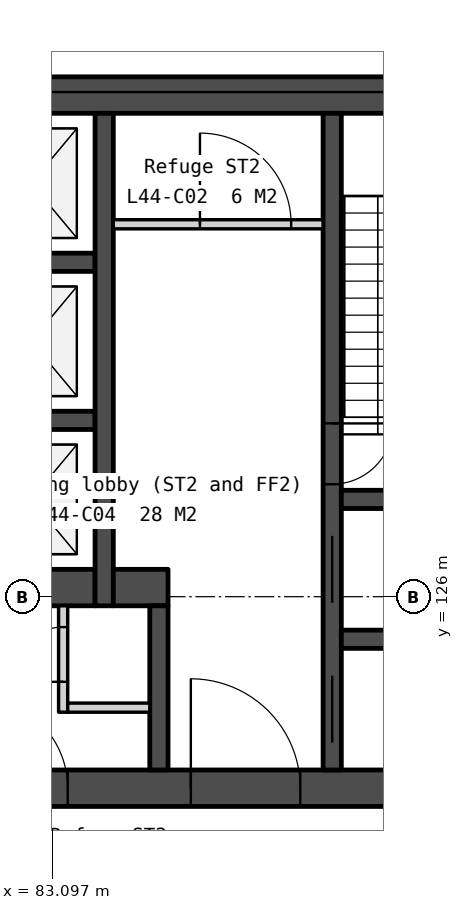
"""IFC4 building model, lengths in metres.
Left out: names, types, materials, properties, quantities, classifications, styles, units other than length and angle.
Written with IfcOpenShell. Run it as: python <this file> out.ifc"""

import sys

from ifc_helpers import new_model, si_unit, direction, frame, frame_2d, origin, place, context, subcontext, project, spatial, rectangle, extrude, element, fill, save


model = new_model("IFC4")
c1 = context("Model", 3, precision=1e-05, world=origin(), true_north=direction((0.0, 1.0)))
c2 = subcontext(c1, "Body", "Model", "MODEL_VIEW")
j1 = project(units=[si_unit("LENGTHUNIT", "METRE"), si_unit("PLANEANGLEUNIT", "RADIAN")], contexts=[c1])
p1 = place(None, origin())
s1 = spatial("IfcSite", under=j1, at=p1, CompositionType="ELEMENT")
p2 = place(p1, origin())
s2 = spatial("IfcBuilding", under=s1, at=p2, CompositionType="ELEMENT")
p3 = place(p2, frame((0.0, 0.0, 175.4)))
s3 = spatial("IfcBuildingStorey", under=s2, at=p3, CompositionType="ELEMENT", Elevation=175.4)
p4 = place(p3, frame((69.0, 134.25, 0.0), z_axis=(0.0, 0.0, 1.0), x_axis=(1.0, 0.0, 0.0)))
e1 = element("IfcWall", 1, at=p4, inside=s3, PredefinedType="SOLIDWALL", context=c2, shape_type="SweptSolid", body=[
    extrude(rectangle(XDim=22.0, YDim=0.6, at=frame_2d((11.0, 0.0))), origin(), (0.0, 0.0, 1.0), 4.35),
])
p5 = place(p3, frame((69.0, 122.85, 0.0), z_axis=(0.0, 0.0, 1.0), x_axis=(1.0, 0.0, 0.0)))
e2 = element("IfcWall", 2, at=p5, inside=s3, PredefinedType="SOLIDWALL", context=c2, shape_type="SweptSolid", body=[
    extrude(rectangle(XDim=22.0, YDim=0.6, at=frame_2d((11.0, 0.0))), origin(), (0.0, 0.0, 1.0), 4.35),
])
p6 = place(p5, frame((16.375, 0.0, 0.0)))
e3 = element("IfcOpeningElement", 3, at=p6, cuts=e2, PredefinedType="OPENING", context=c2, shape_type="SweptSolid", body=[
    extrude(rectangle(XDim=1.8, YDim=2.1, at=frame_2d((0.9, 1.05))), frame((0.0, 0.31, 0.0), z_axis=(0.0, -1.0, 0.0), x_axis=(1.0, 0.0, 0.0)), (0.0, 0.0, 1.0), 0.62),
])
p7 = place(p5, frame((3.825, 0.0, 0.0)))
e4 = element("IfcOpeningElement", 4, at=p7, cuts=e2, PredefinedType="OPENING", context=c2, shape_type="SweptSolid", body=[
    extrude(rectangle(XDim=1.8, YDim=2.1, at=frame_2d((0.9, 1.05))), frame((0.0, 0.31, 0.0), z_axis=(0.0, -1.0, 0.0), x_axis=(1.0, 0.0, 0.0)), (0.0, 0.0, 1.0), 0.62),
])
p8 = place(p5, frame((12.85, 0.0, 0.0)))
e5 = element("IfcOpeningElement", 5, at=p8, cuts=e2, PredefinedType="OPENING", context=c2, shape_type="SweptSolid", body=[
    extrude(rectangle(XDim=1.5, YDim=2.1, at=frame_2d((0.75, 1.05))), frame((0.0, 0.31, 0.0), z_axis=(0.0, -1.0, 0.0), x_axis=(1.0, 0.0, 0.0)), (0.0, 0.0, 1.0), 0.62),
])
for number, where, z_axis, x_axis in (
    (6, (81.7, 131.5, 0.0), (0.0, 0.0, 1.0), (1.0, 0.0, 0.0)),
    (7, (81.7, 128.9, 0.0), (0.0, 0.0, 1.0), (1.0, 0.0, 0.0)),
):
    element("IfcWall", number, at=place(p3, frame(where, z_axis=z_axis, x_axis=x_axis)), inside=s3, PredefinedType="SOLIDWALL", context=c2, shape_type="SweptSolid", body=[
        extrude(rectangle(XDim=2.1, YDim=0.3, at=frame_2d((1.05, 0.0))), origin(), (0.0, 0.0, 1.0), 4.35),
    ])
p9 = place(p3, frame((82.9, 126.15, 0.0), z_axis=(0.0, 0.0, 1.0), x_axis=(1.0, 0.0, 0.0)))
e8 = element("IfcWall", 8, at=p9, inside=s3, PredefinedType="SOLIDWALL", context=c2, shape_type="SweptSolid", body=[
    extrude(rectangle(XDim=0.9, YDim=0.6, at=frame_2d((0.45, 0.0))), origin(), (0.0, 0.0, 1.0), 4.35),
])
p10 = place(p3, frame((83.275, 125.85, 0.0), z_axis=(0.0, 0.0, 1.0), x_axis=(0.0, -1.0, 0.0)))
e9 = element("IfcWall", 9, at=p10, inside=s3, PredefinedType="PARTITIONING", context=c2, shape_type="SweptSolid", body=[
    extrude(rectangle(XDim=1.75, YDim=0.15, at=frame_2d((0.875, 0.0))), origin(), (0.0, 0.0, 1.0), 4.35),
])
p11 = place(p10, frame((0.35, 0.0, 0.0)))
e10 = element("IfcOpeningElement", 10, at=p11, cuts=e9, PredefinedType="OPENING", context=c2, shape_type="SweptSolid", body=[
    extrude(rectangle(XDim=0.9, YDim=2.1, at=frame_2d((0.45, 1.05))), frame((0.0, 0.085, 0.0), z_axis=(0.0, -1.0, 0.0), x_axis=(1.0, 0.0, 0.0)), (0.0, 0.0, 1.0), 0.17),
])
p12 = place(p3, frame((83.35, 124.175, 0.0), z_axis=(0.0, 0.0, 1.0), x_axis=(1.0, 0.0, 0.0)))
e11 = element("IfcWall", 11, at=p12, inside=s3, PredefinedType="PARTITIONING", context=c2, shape_type="SweptSolid", body=[
    extrude(rectangle(XDim=1.35, YDim=0.15, at=frame_2d((0.675, 0.0))), origin(), (0.0, 0.0, 1.0), 4.35),
])
p13 = place(p3, frame((83.95, 133.95, 0.0), z_axis=(0.0, 0.0, 1.0), x_axis=(0.0, -1.0, 0.0)))
e12 = element("IfcWall", 12, at=p13, inside=s3, PredefinedType="SOLIDWALL", context=c2, shape_type="SweptSolid", body=[
    extrude(rectangle(XDim=8.1, YDim=0.3, at=frame_2d((4.05, 0.0))), origin(), (0.0, 0.0, 1.0), 4.35),
])
p14 = place(p3, frame((84.1, 132.125, 0.0), z_axis=(0.0, 0.0, 1.0), x_axis=(1.0, 0.0, 0.0)))
e13 = element("IfcWall", 13, at=p14, inside=s3, PredefinedType="PARTITIONING", context=c2, shape_type="SweptSolid", body=[
    extrude(rectangle(XDim=3.45, YDim=0.15, at=frame_2d((1.725, 0.0))), origin(), (0.0, 0.0, 1.0), 4.35),
])
p15 = place(p14, frame((1.425, 0.0, 0.0)))
e14 = element("IfcOpeningElement", 14, at=p15, cuts=e13, PredefinedType="OPENING", context=c2, shape_type="SweptSolid", body=[
    extrude(rectangle(XDim=1.5, YDim=2.1, at=frame_2d((0.75, 1.05))), frame((0.0, 0.085, 0.0), z_axis=(0.0, -1.0, 0.0), x_axis=(1.0, 0.0, 0.0)), (0.0, 0.0, 1.0), 0.17),
])
p16 = place(p3, frame((84.1, 126.15, 0.0), z_axis=(0.0, 0.0, 1.0), x_axis=(1.0, 0.0, 0.0)))
e15 = element("IfcWall", 15, at=p16, inside=s3, PredefinedType="SOLIDWALL", context=c2, shape_type="SweptSolid", body=[
    extrude(rectangle(XDim=0.9, YDim=0.6, at=frame_2d((0.45, 0.0))), origin(), (0.0, 0.0, 1.0), 4.35),
])
p17 = place(p3, frame((84.85, 125.85, 0.0), z_axis=(0.0, 0.0, 1.0), x_axis=(0.0, -1.0, 0.0)))
e16 = element("IfcWall", 16, at=p17, inside=s3, PredefinedType="SOLIDWALL", context=c2, shape_type="SweptSolid", body=[
    extrude(rectangle(XDim=2.7, YDim=0.3, at=frame_2d((1.35, 0.0))), origin(), (0.0, 0.0, 1.0), 4.35),
])
p18 = place(p3, frame((87.7, 133.95, 0.0), z_axis=(0.0, 0.0, 1.0), x_axis=(0.0, -1.0, 0.0)))
e17 = element("IfcWall", 17, at=p18, inside=s3, PredefinedType="SOLIDWALL", context=c2, shape_type="SweptSolid", body=[
    extrude(rectangle(XDim=10.8, YDim=0.3, at=frame_2d((5.4, 0.0))), origin(), (0.0, 0.0, 1.0), 4.35),
])
p19 = place(p18, frame((6.95, 0.0, 0.0)))
e18 = element("IfcOpeningElement", 18, at=p19, cuts=e17, PredefinedType="OPENING", context=c2, shape_type="SweptSolid", body=[
    extrude(rectangle(XDim=1.1, YDim=2.1, at=frame_2d((0.55, 1.05))), frame((0.0, 0.16, 0.0), z_axis=(0.0, -1.0, 0.0), x_axis=(1.0, 0.0, 0.0)), (0.0, 0.0, 1.0), 0.32),
])
p20 = place(p18, frame((5.1, 0.0, 0.0)))
e19 = element("IfcOpeningElement", 19, at=p20, cuts=e17, PredefinedType="OPENING", context=c2, shape_type="SweptSolid", body=[
    extrude(rectangle(XDim=1.0, YDim=2.1, at=frame_2d((0.5, 1.05))), frame((0.0, 0.16, 0.0), z_axis=(0.0, -1.0, 0.0), x_axis=(1.0, 0.0, 0.0)), (0.0, 0.0, 1.0), 0.32),
])
p21 = place(p18, frame((9.25, 0.0, 0.0)))
e20 = element("IfcOpeningElement", 20, at=p21, cuts=e17, PredefinedType="OPENING", context=c2, shape_type="SweptSolid", body=[
    extrude(rectangle(XDim=1.1, YDim=2.1, at=frame_2d((0.55, 1.05))), frame((0.0, 0.16, 0.0), z_axis=(0.0, -1.0, 0.0), x_axis=(1.0, 0.0, 0.0)), (0.0, 0.0, 1.0), 0.32),
])
for number, where, z_axis, x_axis in (
    (21, (87.85, 127.6, 0.0), (0.0, 0.0, 1.0), (1.0, 0.0, 0.0)),
    (22, (87.85, 125.3, 0.0), (0.0, 0.0, 1.0), (1.0, 0.0, 0.0)),
):
    element("IfcWall", number, at=place(p3, frame(where, z_axis=z_axis, x_axis=x_axis)), inside=s3, PredefinedType="SOLIDWALL", context=c2, shape_type="SweptSolid", body=[
        extrude(rectangle(XDim=2.55, YDim=0.3, at=frame_2d((1.275, 0.0))), origin(), (0.0, 0.0, 1.0), 4.35),
    ])
p22 = place(p19, origin())
e23 = element("IfcDoor", 23, at=p22, inside=s3, OperationType="SLIDING_TO_LEFT", PredefinedType="DOOR", context=c2, shape_type="SweptSolid", body=[
    extrude(rectangle(XDim=1.1, YDim=2.1, at=frame_2d((0.55, 1.05))), frame((0.0, 0.025, 0.0), z_axis=(0.0, -1.0, 0.0), x_axis=(1.0, 0.0, 0.0)), (0.0, 0.0, 1.0), 0.05),
])
fill(e18, e23)
p23 = place(p6, origin())
e24 = element("IfcDoor", 24, at=p23, inside=s3, OperationType="DOUBLE_DOOR_DOUBLE_SWING", PredefinedType="DOOR", context=c2, shape_type="SweptSolid", body=[
    extrude(rectangle(XDim=1.8, YDim=2.1, at=frame_2d((0.9, 1.05))), frame((0.0, 0.025, 0.0), z_axis=(0.0, -1.0, 0.0), x_axis=(1.0, 0.0, 0.0)), (0.0, 0.0, 1.0), 0.05),
])
fill(e3, e24)
p24 = place(p8, origin())
e25 = element("IfcDoor", 25, at=p24, inside=s3, OperationType="DOUBLE_DOOR_DOUBLE_SWING", PredefinedType="DOOR", context=c2, shape_type="SweptSolid", body=[
    extrude(rectangle(XDim=1.5, YDim=2.1, at=frame_2d((0.75, 1.05))), frame((0.0, 0.025, 0.0), z_axis=(0.0, -1.0, 0.0), x_axis=(1.0, 0.0, 0.0)), (0.0, 0.0, 1.0), 0.05),
])
fill(e5, e25)
p25 = place(p11, origin())
e26 = element("IfcDoor", 26, at=p25, inside=s3, OperationType="SINGLE_SWING_RIGHT", PredefinedType="DOOR", context=c2, shape_type="SweptSolid", body=[
    extrude(rectangle(XDim=0.9, YDim=2.1, at=frame_2d((0.45, 1.05))), frame((0.0, 0.025, 0.0), z_axis=(0.0, -1.0, 0.0), x_axis=(1.0, 0.0, 0.0)), (0.0, 0.0, 1.0), 0.05),
])
fill(e10, e26)
p26 = place(p15, origin())
e27 = element("IfcDoor", 27, at=p26, inside=s3, OperationType="DOUBLE_DOOR_DOUBLE_SWING", PredefinedType="DOOR", context=c2, shape_type="SweptSolid", body=[
    extrude(rectangle(XDim=1.5, YDim=2.1, at=frame_2d((0.75, 1.05))), frame((0.0, 0.025, 0.0), z_axis=(0.0, -1.0, 0.0), x_axis=(1.0, 0.0, 0.0)), (0.0, 0.0, 1.0), 0.05),
])
fill(e14, e27)
p27 = place(p20, origin())
e28 = element("IfcDoor", 28, at=p27, inside=s3, OperationType="SINGLE_SWING_LEFT", PredefinedType="DOOR", context=c2, shape_type="SweptSolid", body=[
    extrude(rectangle(XDim=1.0, YDim=2.1, at=frame_2d((0.5, 1.05))), frame((0.0, 0.025, 0.0), z_axis=(0.0, -1.0, 0.0), x_axis=(1.0, 0.0, 0.0)), (0.0, 0.0, 1.0), 0.05),
])
fill(e19, e28)
p28 = place(p21, origin())
e29 = element("IfcDoor", 29, at=p28, inside=s3, OperationType="SLIDING_TO_LEFT", PredefinedType="DOOR", context=c2, shape_type="SweptSolid", body=[
    extrude(rectangle(XDim=1.1, YDim=2.1, at=frame_2d((0.55, 1.05))), frame((0.0, 0.025, 0.0), z_axis=(0.0, -1.0, 0.0), x_axis=(1.0, 0.0, 0.0)), (0.0, 0.0, 1.0), 0.05),
])
fill(e20, e29)
save(model, sys.argv[1])
